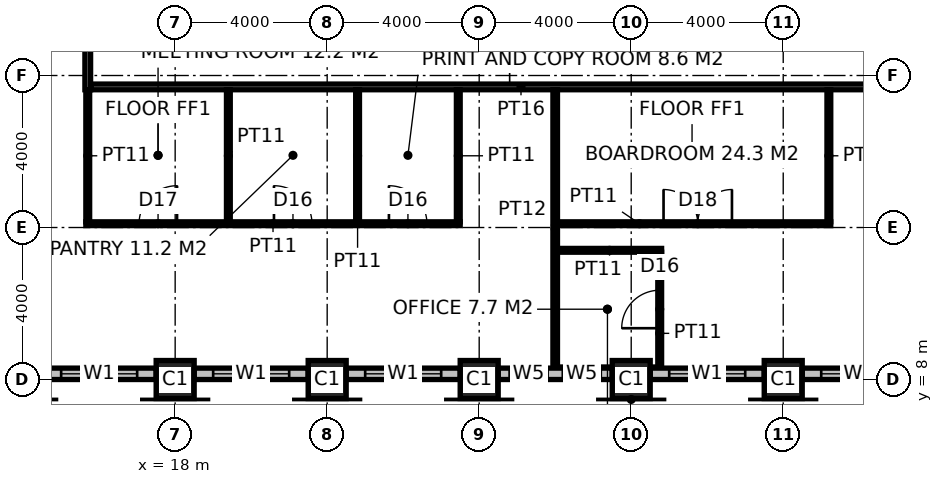
"""IFC4 building model, lengths in metres.
Left out: names, types, materials, properties, quantities, classifications, styles, units other than length and angle.
Written with IfcOpenShell. Run it as: python <this file> out.ifc"""

import sys

from ifc_helpers import new_model, si_unit, direction, frame, frame_2d, origin, origin_2d, place, context, subcontext, project, spatial, rectangle, hollow_rectangle, extrude, element, fill, save


model = new_model("IFC4")
c1 = context("Model", 3, precision=1e-05, world=origin(), true_north=direction((0.0, 1.0)))
c2 = subcontext(c1, "Body", "Model", "MODEL_VIEW")
j1 = project(units=[si_unit("LENGTHUNIT", "METRE"), si_unit("PLANEANGLEUNIT", "RADIAN")], contexts=[c1])
p1 = place(None, origin())
s1 = spatial("IfcSite", under=j1, at=p1, CompositionType="ELEMENT")
p2 = place(p1, origin())
s2 = spatial("IfcBuilding", under=s1, at=p2, CompositionType="ELEMENT")
p3 = place(p2, frame((0.0, 0.0, 226.2)))
s3 = spatial("IfcBuildingStorey", under=s2, at=p3, CompositionType="ELEMENT", Elevation=226.2)
for number, where, z_axis, x_axis in (
    (1, (18.0, 8.0, 0.0), (0.0, 0.0, 1.0), (1.0, 0.0, 0.0)),
    (2, (22.0, 8.0, 0.0), (0.0, 0.0, 1.0), (1.0, 0.0, 0.0)),
    (3, (26.0, 8.0, 0.0), (0.0, 0.0, 1.0), (1.0, 0.0, 0.0)),
    (4, (30.0, 8.0, 0.0), (0.0, 0.0, 1.0), (1.0, 0.0, 0.0)),
    (5, (34.0, 8.0, 0.0), (0.0, 0.0, 1.0), (1.0, 0.0, 0.0)),
):
    element("IfcColumn", number, at=place(p3, frame(where, z_axis=z_axis, x_axis=x_axis)), inside=s3, PredefinedType="COLUMN", context=c2, shape_type="SweptSolid", body=[
        extrude(hollow_rectangle(XDim=1.0, YDim=1.0, WallThickness=0.1, at=origin_2d()), origin(), (0.0, 0.0, 1.0), 4.0),
    ])
p4 = place(p3, frame((15.7, 15.625, 0.0), z_axis=(0.0, 0.0, 1.0), x_axis=(0.0, 1.0, 0.0)))
e6 = element("IfcWall", 6, at=p4, inside=s3, PredefinedType="PARTITIONING", context=c2, shape_type="SweptSolid", body=[
    extrude(rectangle(XDim=22.75, YDim=0.15, at=frame_2d((11.375, 0.0))), origin(), (0.0, 0.0, 1.0), 3.85),
])
p5 = place(p4, frame((10.475, 0.0, 0.0)))
e7 = element("IfcOpeningElement", 7, at=p5, cuts=e6, PredefinedType="OPENING", context=c2, shape_type="SweptSolid", body=[
    extrude(rectangle(XDim=1.8, YDim=2.4, at=frame_2d((0.9, 1.2))), frame((0.0, 0.085, 0.0), z_axis=(0.0, -1.0, 0.0), x_axis=(1.0, 0.0, 0.0)), (0.0, 0.0, 1.0), 0.17),
])
p6 = place(p3, frame((15.775, 15.7, 0.0), z_axis=(0.0, 0.0, 1.0), x_axis=(1.0, 0.0, 0.0)))
e8 = element("IfcWall", 8, at=p6, inside=s3, PredefinedType="PARTITIONING", context=c2, shape_type="SweptSolid", body=[
    extrude(rectangle(XDim=22.65, YDim=0.15, at=frame_2d((11.325, 0.0))), origin(), (0.0, 0.0, 1.0), 3.85),
])
p7 = place(p3, frame((28.0, 8.3, 0.0), z_axis=(0.0, 0.0, 1.0), x_axis=(0.0, 1.0, 0.0)))
e9 = element("IfcWall", 9, at=p7, inside=s3, PredefinedType="PARTITIONING", context=c2, shape_type="SweptSolid", body=[
    extrude(rectangle(XDim=7.325, YDim=0.12, at=frame_2d((3.663, 0.0))), origin(), (0.0, 0.0, 1.0), 3.85),
])
p8 = place(p3, frame((28.06, 11.4, 0.0), z_axis=(0.0, 0.0, 1.0), x_axis=(1.0, 0.0, 0.0)))
e10 = element("IfcWall", 10, at=p8, inside=s3, PredefinedType="PARTITIONING", context=c2, shape_type="SweptSolid", body=[
    extrude(rectangle(XDim=2.74, YDim=0.1, at=frame_2d((1.37, 0.0))), origin(), (0.0, 0.0, 1.0), 3.85),
])
p9 = place(p3, frame((15.65, 12.1, 0.0), z_axis=(0.0, 0.0, 1.0), x_axis=(1.0, 0.0, 0.0)))
e11 = element("IfcWall", 11, at=p9, inside=s3, PredefinedType="PARTITIONING", context=c2, shape_type="SweptSolid", body=[
    extrude(rectangle(XDim=9.85, YDim=0.1, at=frame_2d((4.925, 0.0))), origin(), (0.0, 0.0, 1.0), 3.85),
])
p10 = place(p9, frame((1.4, 0.0, 0.0)))
e12 = element("IfcOpeningElement", 12, at=p10, cuts=e11, PredefinedType="OPENING", context=c2, shape_type="SweptSolid", body=[
    extrude(rectangle(XDim=1.0, YDim=2.2, at=frame_2d((0.5, 1.1))), frame((0.0, 0.06, 0.0), z_axis=(0.0, -1.0, 0.0), x_axis=(1.0, 0.0, 0.0)), (0.0, 0.0, 1.0), 0.12),
])
p11 = place(p9, frame((4.95, 0.0, 0.0)))
e13 = element("IfcOpeningElement", 13, at=p11, cuts=e11, PredefinedType="OPENING", context=c2, shape_type="SweptSolid", body=[
    extrude(rectangle(XDim=1.0, YDim=2.2, at=frame_2d((0.5, 1.1))), frame((0.0, 0.06, 0.0), z_axis=(0.0, -1.0, 0.0), x_axis=(1.0, 0.0, 0.0)), (0.0, 0.0, 1.0), 0.12),
])
p12 = place(p9, frame((7.975, 0.0, 0.0)))
e14 = element("IfcOpeningElement", 14, at=p12, cuts=e11, PredefinedType="OPENING", context=c2, shape_type="SweptSolid", body=[
    extrude(rectangle(XDim=1.0, YDim=2.2, at=frame_2d((0.5, 1.1))), frame((0.0, 0.06, 0.0), z_axis=(0.0, -1.0, 0.0), x_axis=(1.0, 0.0, 0.0)), (0.0, 0.0, 1.0), 0.12),
])
p13 = place(p3, frame((28.061, 12.1, 0.0), z_axis=(0.0, 0.0, 1.0), x_axis=(1.0, 0.0, 0.0)))
e15 = element("IfcWall", 15, at=p13, inside=s3, PredefinedType="PARTITIONING", context=c2, shape_type="SweptSolid", body=[
    extrude(rectangle(XDim=7.19, YDim=0.1, at=frame_2d((3.595, 0.0))), origin(), (0.0, 0.0, 1.0), 3.85),
])
p14 = place(p13, frame((2.79, 0.0, 0.0)))
e16 = element("IfcOpeningElement", 16, at=p14, cuts=e15, PredefinedType="OPENING", context=c2, shape_type="SweptSolid", body=[
    extrude(rectangle(XDim=1.8, YDim=2.4, at=frame_2d((0.9, 1.2))), frame((0.0, 0.06, 0.0), z_axis=(0.0, -1.0, 0.0), x_axis=(1.0, 0.0, 0.0)), (0.0, 0.0, 1.0), 0.12),
])
for number, where, z_axis, x_axis in (
    (17, (15.7, 12.15, 0.0), (0.0, 0.0, 1.0), (0.0, 1.0, 0.0)),
    (18, (19.4, 12.15, 0.0), (0.0, 0.0, 1.0), (0.0, 1.0, 0.0)),
    (19, (22.8, 12.15, 0.0), (0.0, 0.0, 1.0), (0.0, 1.0, 0.0)),
    (20, (25.45, 12.15, 0.0), (0.0, 0.0, 1.0), (0.0, 1.0, 0.0)),
):
    element("IfcWall", number, at=place(p3, frame(where, z_axis=z_axis, x_axis=x_axis)), inside=s3, PredefinedType="PARTITIONING", context=c2, shape_type="SweptSolid", body=[
        extrude(rectangle(XDim=3.475, YDim=0.1, at=frame_2d((1.738, 0.0))), origin(), (0.0, 0.0, 1.0), 3.85),
    ])
p15 = place(p3, frame((30.75, 8.3, 0.0), z_axis=(0.0, 0.0, 1.0), x_axis=(0.0, 1.0, 0.0)))
e21 = element("IfcWall", 21, at=p15, inside=s3, PredefinedType="PARTITIONING", context=c2, shape_type="SweptSolid", body=[
    extrude(rectangle(XDim=3.05, YDim=0.1, at=frame_2d((1.525, 0.0))), origin(), (0.0, 0.0, 1.0), 3.85),
])
p16 = place(p15, frame((1.05, 0.0, 0.0)))
e22 = element("IfcOpeningElement", 22, at=p16, cuts=e21, PredefinedType="OPENING", context=c2, shape_type="SweptSolid", body=[
    extrude(rectangle(XDim=1.0, YDim=2.2, at=frame_2d((0.5, 1.1))), frame((0.0, 0.06, 0.0), z_axis=(0.0, -1.0, 0.0), x_axis=(1.0, 0.0, 0.0)), (0.0, 0.0, 1.0), 0.12),
])
p17 = place(p3, frame((35.201, 12.15, 0.0), z_axis=(0.0, 0.0, 1.0), x_axis=(0.0, 1.0, 0.0)))
e23 = element("IfcWall", 23, at=p17, inside=s3, PredefinedType="PARTITIONING", context=c2, shape_type="SweptSolid", body=[
    extrude(rectangle(XDim=3.475, YDim=0.1, at=frame_2d((1.738, 0.0))), origin(), (0.0, 0.0, 1.0), 3.85),
])
p18 = place(p3, frame((14.5, 8.15, 0.0), z_axis=(0.0, 0.0, 1.0), x_axis=(1.0, 0.0, 0.0)))
e24 = element("IfcWall", 24, at=p18, inside=s3, PredefinedType="ELEMENTEDWALL", context=c2, shape_type="SweptSolid", body=[
    extrude(rectangle(XDim=3.0, YDim=0.3, at=frame_2d((1.5, 0.0))), origin(), (0.0, 0.0, 1.0), 2.85),
])
p19 = place(p18, frame((0.5, 0.0, 0.8)))
e25 = element("IfcOpeningElement", 25, at=p19, cuts=e24, PredefinedType="OPENING", context=c2, shape_type="SweptSolid", body=[
    extrude(rectangle(XDim=2.0, YDim=2.0, at=frame_2d((1.0, 1.0))), frame((0.0, 0.16, 0.0), z_axis=(0.0, -1.0, 0.0), x_axis=(1.0, 0.0, 0.0)), (0.0, 0.0, 1.0), 0.32),
])
p20 = place(p3, frame((18.5, 8.15, 0.0), z_axis=(0.0, 0.0, 1.0), x_axis=(1.0, 0.0, 0.0)))
e26 = element("IfcWall", 26, at=p20, inside=s3, PredefinedType="ELEMENTEDWALL", context=c2, shape_type="SweptSolid", body=[
    extrude(rectangle(XDim=3.0, YDim=0.3, at=frame_2d((1.5, 0.0))), origin(), (0.0, 0.0, 1.0), 2.85),
])
p21 = place(p20, frame((0.5, 0.0, 0.8)))
e27 = element("IfcOpeningElement", 27, at=p21, cuts=e26, PredefinedType="OPENING", context=c2, shape_type="SweptSolid", body=[
    extrude(rectangle(XDim=2.0, YDim=2.0, at=frame_2d((1.0, 1.0))), frame((0.0, 0.16, 0.0), z_axis=(0.0, -1.0, 0.0), x_axis=(1.0, 0.0, 0.0)), (0.0, 0.0, 1.0), 0.32),
])
p22 = place(p3, frame((22.5, 8.15, 0.0), z_axis=(0.0, 0.0, 1.0), x_axis=(1.0, 0.0, 0.0)))
e28 = element("IfcWall", 28, at=p22, inside=s3, PredefinedType="ELEMENTEDWALL", context=c2, shape_type="SweptSolid", body=[
    extrude(rectangle(XDim=3.0, YDim=0.3, at=frame_2d((1.5, 0.0))), origin(), (0.0, 0.0, 1.0), 2.85),
])
p23 = place(p22, frame((0.5, 0.0, 0.8)))
e29 = element("IfcOpeningElement", 29, at=p23, cuts=e28, PredefinedType="OPENING", context=c2, shape_type="SweptSolid", body=[
    extrude(rectangle(XDim=2.0, YDim=2.0, at=frame_2d((1.0, 1.0))), frame((0.0, 0.16, 0.0), z_axis=(0.0, -1.0, 0.0), x_axis=(1.0, 0.0, 0.0)), (0.0, 0.0, 1.0), 0.32),
])
p24 = place(p3, frame((26.5, 8.15, 0.0), z_axis=(0.0, 0.0, 1.0), x_axis=(1.0, 0.0, 0.0)))
e30 = element("IfcWall", 30, at=p24, inside=s3, PredefinedType="ELEMENTEDWALL", context=c2, shape_type="SweptSolid", body=[
    extrude(rectangle(XDim=3.0, YDim=0.3, at=frame_2d((1.5, 0.0))), origin(), (0.0, 0.0, 1.0), 2.85),
])
p25 = place(p24, frame((0.3, 0.0, 0.8)))
e31 = element("IfcOpeningElement", 31, at=p25, cuts=e30, PredefinedType="OPENING", context=c2, shape_type="SweptSolid", body=[
    extrude(rectangle(XDim=1.0, YDim=2.0, at=frame_2d((0.5, 1.0))), frame((0.0, 0.16, 0.0), z_axis=(0.0, -1.0, 0.0), x_axis=(1.0, 0.0, 0.0)), (0.0, 0.0, 1.0), 0.32),
])
p26 = place(p24, frame((1.7, 0.0, 0.8)))
e32 = element("IfcOpeningElement", 32, at=p26, cuts=e30, PredefinedType="OPENING", context=c2, shape_type="SweptSolid", body=[
    extrude(rectangle(XDim=1.0, YDim=2.0, at=frame_2d((0.5, 1.0))), frame((0.0, 0.16, 0.0), z_axis=(0.0, -1.0, 0.0), x_axis=(1.0, 0.0, 0.0)), (0.0, 0.0, 1.0), 0.32),
])
p27 = place(p3, frame((30.5, 8.15, 0.0), z_axis=(0.0, 0.0, 1.0), x_axis=(1.0, 0.0, 0.0)))
e33 = element("IfcWall", 33, at=p27, inside=s3, PredefinedType="ELEMENTEDWALL", context=c2, shape_type="SweptSolid", body=[
    extrude(rectangle(XDim=3.0, YDim=0.3, at=frame_2d((1.5, 0.0))), origin(), (0.0, 0.0, 1.0), 2.85),
])
p28 = place(p27, frame((0.5, 0.0, 0.8)))
e34 = element("IfcOpeningElement", 34, at=p28, cuts=e33, PredefinedType="OPENING", context=c2, shape_type="SweptSolid", body=[
    extrude(rectangle(XDim=2.0, YDim=2.0, at=frame_2d((1.0, 1.0))), frame((0.0, 0.16, 0.0), z_axis=(0.0, -1.0, 0.0), x_axis=(1.0, 0.0, 0.0)), (0.0, 0.0, 1.0), 0.32),
])
p29 = place(p3, frame((34.5, 8.15, 0.0), z_axis=(0.0, 0.0, 1.0), x_axis=(1.0, 0.0, 0.0)))
e35 = element("IfcWall", 35, at=p29, inside=s3, PredefinedType="ELEMENTEDWALL", context=c2, shape_type="SweptSolid", body=[
    extrude(rectangle(XDim=3.0, YDim=0.3, at=frame_2d((1.5, 0.0))), origin(), (0.0, 0.0, 1.0), 2.85),
])
p30 = place(p29, frame((0.5, 0.0, 0.8)))
e36 = element("IfcOpeningElement", 36, at=p30, cuts=e35, PredefinedType="OPENING", context=c2, shape_type="SweptSolid", body=[
    extrude(rectangle(XDim=2.0, YDim=2.0, at=frame_2d((1.0, 1.0))), frame((0.0, 0.16, 0.0), z_axis=(0.0, -1.0, 0.0), x_axis=(1.0, 0.0, 0.0)), (0.0, 0.0, 1.0), 0.32),
])
p31 = place(p10, origin())
e37 = element("IfcDoor", 37, at=p31, inside=s3, OperationType="SINGLE_SWING_RIGHT", PredefinedType="DOOR", context=c2, shape_type="SweptSolid", body=[
    extrude(rectangle(XDim=1.0, YDim=2.2, at=frame_2d((0.5, 1.1))), frame((0.0, 0.025, 0.0), z_axis=(0.0, -1.0, 0.0), x_axis=(1.0, 0.0, 0.0)), (0.0, 0.0, 1.0), 0.05),
])
fill(e12, e37)
p32 = place(p11, origin())
e38 = element("IfcDoor", 38, at=p32, inside=s3, OperationType="SINGLE_SWING_LEFT", PredefinedType="DOOR", context=c2, shape_type="SweptSolid", body=[
    extrude(rectangle(XDim=1.0, YDim=2.2, at=frame_2d((0.5, 1.1))), frame((0.0, 0.025, 0.0), z_axis=(0.0, -1.0, 0.0), x_axis=(1.0, 0.0, 0.0)), (0.0, 0.0, 1.0), 0.05),
])
fill(e13, e38)
p33 = place(p12, origin())
e39 = element("IfcDoor", 39, at=p33, inside=s3, OperationType="SINGLE_SWING_LEFT", PredefinedType="DOOR", context=c2, shape_type="SweptSolid", body=[
    extrude(rectangle(XDim=1.0, YDim=2.2, at=frame_2d((0.5, 1.1))), frame((0.0, 0.025, 0.0), z_axis=(0.0, -1.0, 0.0), x_axis=(1.0, 0.0, 0.0)), (0.0, 0.0, 1.0), 0.05),
])
fill(e14, e39)
p34 = place(p14, origin())
e40 = element("IfcDoor", 40, at=p34, inside=s3, OperationType="DOUBLE_DOOR_DOUBLE_SWING", PredefinedType="DOOR", context=c2, shape_type="SweptSolid", body=[
    extrude(rectangle(XDim=1.8, YDim=2.4, at=frame_2d((0.9, 1.2))), frame((0.0, 0.025, 0.0), z_axis=(0.0, -1.0, 0.0), x_axis=(1.0, 0.0, 0.0)), (0.0, 0.0, 1.0), 0.05),
])
fill(e16, e40)
p35 = place(p16, origin())
e41 = element("IfcDoor", 41, at=p35, inside=s3, OperationType="SINGLE_SWING_LEFT", PredefinedType="DOOR", context=c2, shape_type="SweptSolid", body=[
    extrude(rectangle(XDim=1.0, YDim=2.2, at=frame_2d((0.5, 1.1))), frame((0.0, 0.025, 0.0), z_axis=(0.0, -1.0, 0.0), x_axis=(1.0, 0.0, 0.0)), (0.0, 0.0, 1.0), 0.05),
])
fill(e22, e41)
p36 = place(p19, origin())
e42 = element("IfcWindow", 42, at=p36, inside=s3, PartitioningType="SINGLE_PANEL", PredefinedType="WINDOW", context=c2, shape_type="SweptSolid", body=[
    extrude(rectangle(XDim=2.0, YDim=2.0, at=frame_2d((1.0, 1.0))), frame((0.0, 0.03, 0.0), z_axis=(0.0, -1.0, 0.0), x_axis=(1.0, 0.0, 0.0)), (0.0, 0.0, 1.0), 0.06),
])
fill(e25, e42)
p37 = place(p21, origin())
e43 = element("IfcWindow", 43, at=p37, inside=s3, PartitioningType="SINGLE_PANEL", PredefinedType="WINDOW", context=c2, shape_type="SweptSolid", body=[
    extrude(rectangle(XDim=2.0, YDim=2.0, at=frame_2d((1.0, 1.0))), frame((0.0, 0.03, 0.0), z_axis=(0.0, -1.0, 0.0), x_axis=(1.0, 0.0, 0.0)), (0.0, 0.0, 1.0), 0.06),
])
fill(e27, e43)
p38 = place(p23, origin())
e44 = element("IfcWindow", 44, at=p38, inside=s3, PartitioningType="SINGLE_PANEL", PredefinedType="WINDOW", context=c2, shape_type="SweptSolid", body=[
    extrude(rectangle(XDim=2.0, YDim=2.0, at=frame_2d((1.0, 1.0))), frame((0.0, 0.03, 0.0), z_axis=(0.0, -1.0, 0.0), x_axis=(1.0, 0.0, 0.0)), (0.0, 0.0, 1.0), 0.06),
])
fill(e29, e44)
p39 = place(p25, origin())
e45 = element("IfcWindow", 45, at=p39, inside=s3, PartitioningType="SINGLE_PANEL", PredefinedType="WINDOW", context=c2, shape_type="SweptSolid", body=[
    extrude(rectangle(XDim=1.0, YDim=2.0, at=frame_2d((0.5, 1.0))), frame((0.0, 0.03, 0.0), z_axis=(0.0, -1.0, 0.0), x_axis=(1.0, 0.0, 0.0)), (0.0, 0.0, 1.0), 0.06),
])
fill(e31, e45)
p40 = place(p26, origin())
e46 = element("IfcWindow", 46, at=p40, inside=s3, PartitioningType="SINGLE_PANEL", PredefinedType="WINDOW", context=c2, shape_type="SweptSolid", body=[
    extrude(rectangle(XDim=1.0, YDim=2.0, at=frame_2d((0.5, 1.0))), frame((0.0, 0.03, 0.0), z_axis=(0.0, -1.0, 0.0), x_axis=(1.0, 0.0, 0.0)), (0.0, 0.0, 1.0), 0.06),
])
fill(e32, e46)
p41 = place(p28, origin())
e47 = element("IfcWindow", 47, at=p41, inside=s3, PartitioningType="SINGLE_PANEL", PredefinedType="WINDOW", context=c2, shape_type="SweptSolid", body=[
    extrude(rectangle(XDim=2.0, YDim=2.0, at=frame_2d((1.0, 1.0))), frame((0.0, 0.03, 0.0), z_axis=(0.0, -1.0, 0.0), x_axis=(1.0, 0.0, 0.0)), (0.0, 0.0, 1.0), 0.06),
])
fill(e34, e47)
p42 = place(p30, origin())
e48 = element("IfcWindow", 48, at=p42, inside=s3, PartitioningType="SINGLE_PANEL", PredefinedType="WINDOW", context=c2, shape_type="SweptSolid", body=[
    extrude(rectangle(XDim=2.0, YDim=2.0, at=frame_2d((1.0, 1.0))), frame((0.0, 0.03, 0.0), z_axis=(0.0, -1.0, 0.0), x_axis=(1.0, 0.0, 0.0)), (0.0, 0.0, 1.0), 0.06),
])
fill(e36, e48)
save(model, sys.argv[1])
